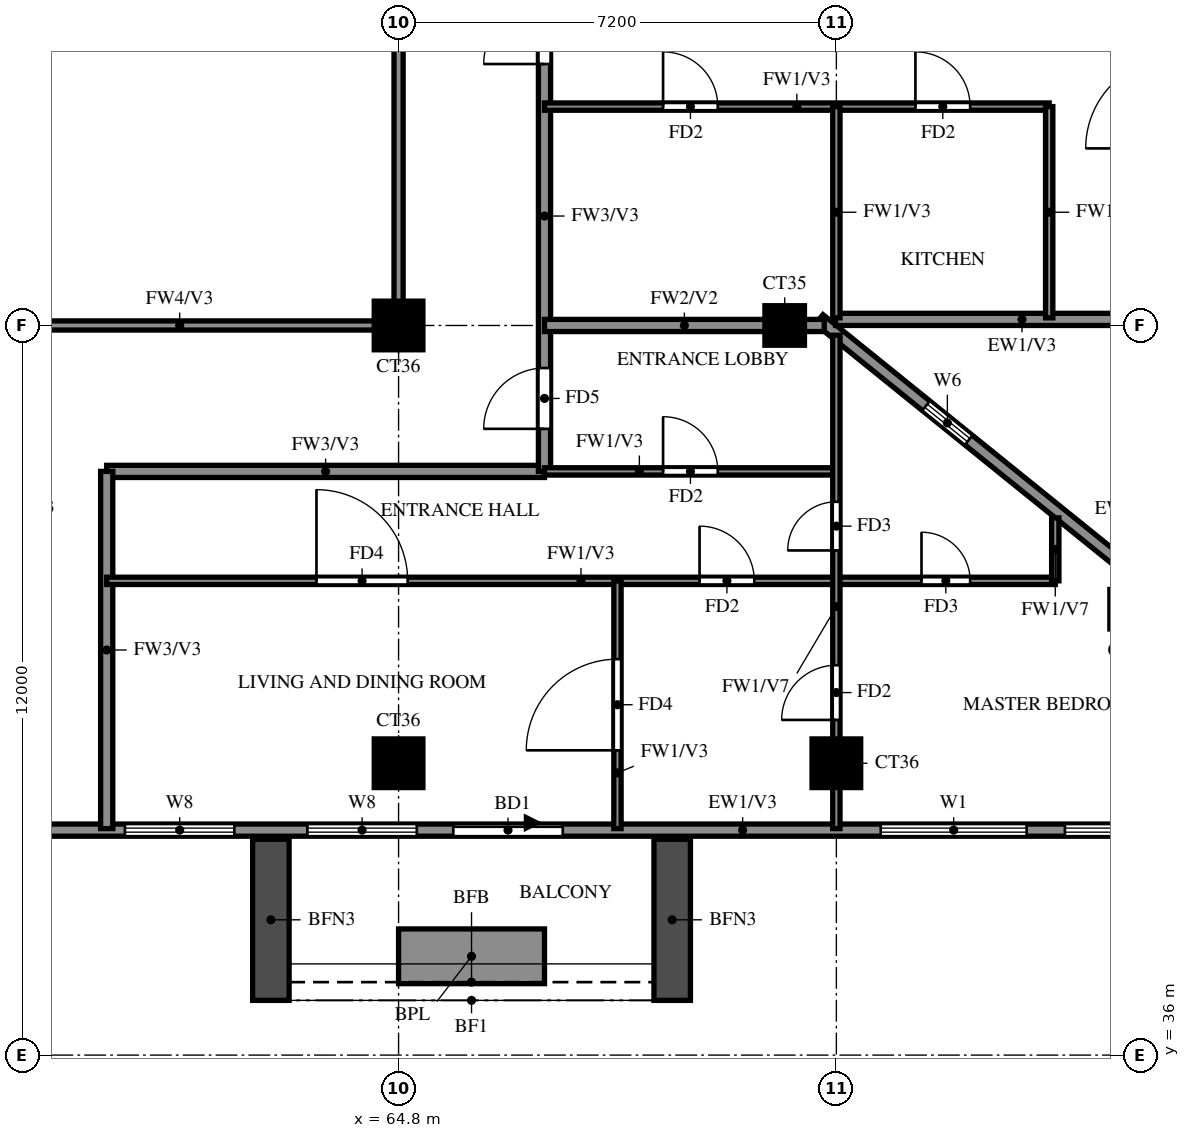
"""IFC4 building model, lengths in metres.
Left out: names, types, materials, properties, quantities, classifications, styles, units other than length and angle.
Written with IfcOpenShell. Run it as: python <this file> out.ifc"""

import sys

from ifc_helpers import new_model, si_unit, direction, frame, frame_2d, origin, origin_2d, place, context, subcontext, project, spatial, rectangle, extrude, source, transform, mapped, element, fill, save


model = new_model("IFC4")
c1 = context("Model", 3, precision=1e-05, world=origin(), true_north=direction((0.0, 1.0)))
c2 = subcontext(c1, "Body", "Model", "MODEL_VIEW")
j1 = project(units=[si_unit("LENGTHUNIT", "METRE"), si_unit("PLANEANGLEUNIT", "RADIAN")], contexts=[c1])
p1 = place(None, origin())
s1 = spatial("IfcSite", under=j1, at=p1, CompositionType="ELEMENT")
p2 = place(p1, origin())
s2 = spatial("IfcBuilding", under=s1, at=p2, CompositionType="ELEMENT")
p3 = place(p2, frame((0.0, 0.0, 250.0)))
s3 = spatial("IfcBuildingStorey", under=s2, at=p3, CompositionType="ELEMENT", Elevation=250.0)
m1 = source(origin(), c2, "Body", "SweptSolid", [
    extrude(rectangle(XDim=0.8, YDim=0.8, at=origin_2d()), origin(), (0.0, 0.0, 1.0), 3.22),
])
for number, where, z_axis, x_axis in (
    (1, (64.8, 40.8, 0.0), (0.0, 0.0, 1.0), (1.0, 0.0, 0.0)),
    (2, (72.0, 40.8, 0.0), (0.0, 0.0, 1.0), (1.0, 0.0, 0.0)),
):
    element("IfcColumn", number, at=place(p3, frame(where, z_axis=z_axis, x_axis=x_axis)), inside=s3, PredefinedType="COLUMN", context=c2, shape_type="MappedRepresentation", body=[
        mapped(m1, transform((0.0, 0.0, 0.0))),
    ])
m2 = source(origin(), c2, "Body", "SweptSolid", [
    extrude(rectangle(XDim=0.65, YDim=0.65, at=origin_2d()), origin(), (0.0, 0.0, 1.0), 3.22),
])
p4 = place(p3, frame((76.823, 43.333, 0.0), z_axis=(0.0, 0.0, 1.0), x_axis=(1.0, 0.0, 0.0)))
e3 = element("IfcColumn", 3, at=p4, inside=s3, PredefinedType="COLUMN", context=c2, shape_type="MappedRepresentation", body=[
    mapped(m2, transform((0.0, 0.0, 0.0))),
])
p5 = place(p3, frame((64.8, 48.0, 0.0), z_axis=(0.0, 0.0, 1.0), x_axis=(1.0, 0.0, 0.0)))
e4 = element("IfcColumn", 4, at=p5, inside=s3, PredefinedType="COLUMN", context=c2, shape_type="MappedRepresentation", body=[
    mapped(m1, transform((0.0, 0.0, 0.0))),
])
p6 = place(p3, frame((71.15, 48.0, 0.0), z_axis=(0.0, 0.0, 1.0), x_axis=(1.0, 0.0, 0.0)))
e5 = element("IfcColumn", 5, at=p6, inside=s3, PredefinedType="COLUMN", context=c2, shape_type="MappedRepresentation", body=[
    mapped(m2, transform((0.0, 0.0, 0.0))),
])
p7 = place(p3, frame((81.907, 39.87, 0.0), z_axis=(0.0, 0.0, 1.0), x_axis=(-0.777936274417, 0.62834318087, 0.0)))
e6 = element("IfcWall", 6, at=p7, inside=s3, PredefinedType="SOLIDWALL", context=c2, shape_type="SweptSolid", body=[
    extrude(rectangle(XDim=13.099, YDim=0.2, at=frame_2d((6.549, 0.0))), origin(), (0.0, 0.0, 1.0), 3.22),
])
p8 = place(p7, frame((9.938, 0.0, 1.5)))
e7 = element("IfcOpeningElement", 7, at=p8, cuts=e6, PredefinedType="OPENING", context=c2, shape_type="SweptSolid", body=[
    extrude(rectangle(XDim=0.9, YDim=0.9, at=frame_2d((0.45, 0.45))), frame((0.0, 0.11, 0.0), z_axis=(0.0, -1.0, 0.0), x_axis=(1.0, 0.0, 0.0)), (0.0, 0.0, 1.0), 0.22),
])
p9 = place(p3, frame((71.987, 48.1, 0.0), z_axis=(0.0, 0.0, 1.0), x_axis=(1.0, 0.0, 0.0)))
e8 = element("IfcWall", 8, at=p9, inside=s3, PredefinedType="SOLIDWALL", context=c2, shape_type="SweptSolid", body=[
    extrude(rectangle(XDim=6.813, YDim=0.2, at=frame_2d((3.406, 0.0))), origin(), (0.0, 0.0, 1.0), 3.22),
])
p10 = place(p3, frame((58.8, 39.7, 0.0), z_axis=(0.0, 0.0, 1.0), x_axis=(1.0, 0.0, 0.0)))
e9 = element("IfcWall", 9, at=p10, inside=s3, PredefinedType="SOLIDWALL", context=c2, shape_type="SweptSolid", body=[
    extrude(rectangle(XDim=23.317, YDim=0.2, at=frame_2d((11.658, 0.0))), origin(), (0.0, 0.0, 1.0), 3.22),
])
p11 = place(p10, frame((6.9, 0.0, 0.0)))
e10 = element("IfcOpeningElement", 10, at=p11, cuts=e9, PredefinedType="OPENING", context=c2, shape_type="SweptSolid", body=[
    extrude(rectangle(XDim=1.8, YDim=2.4, at=frame_2d((0.9, 1.2))), frame((0.0, 0.11, 0.0), z_axis=(0.0, -1.0, 0.0), x_axis=(1.0, 0.0, 0.0)), (0.0, 0.0, 1.0), 0.22),
])
p12 = place(p10, frame((1.5, 0.0, 0.6)))
e11 = element("IfcOpeningElement", 11, at=p12, cuts=e9, PredefinedType="OPENING", context=c2, shape_type="SweptSolid", body=[
    extrude(rectangle(XDim=1.8, YDim=2.4, at=frame_2d((0.9, 1.2))), frame((0.0, 0.11, 0.0), z_axis=(0.0, -1.0, 0.0), x_axis=(1.0, 0.0, 0.0)), (0.0, 0.0, 1.0), 0.22),
])
p13 = place(p10, frame((4.5, 0.0, 0.6)))
e12 = element("IfcOpeningElement", 12, at=p13, cuts=e9, PredefinedType="OPENING", context=c2, shape_type="SweptSolid", body=[
    extrude(rectangle(XDim=1.8, YDim=2.4, at=frame_2d((0.9, 1.2))), frame((0.0, 0.11, 0.0), z_axis=(0.0, -1.0, 0.0), x_axis=(1.0, 0.0, 0.0)), (0.0, 0.0, 1.0), 0.22),
])
p14 = place(p10, frame((13.929, 0.0, 0.6)))
e13 = element("IfcOpeningElement", 13, at=p14, cuts=e9, PredefinedType="OPENING", context=c2, shape_type="SweptSolid", body=[
    extrude(rectangle(XDim=2.4, YDim=2.4, at=frame_2d((1.2, 1.2))), frame((0.0, 0.11, 0.0), z_axis=(0.0, -1.0, 0.0), x_axis=(1.0, 0.0, 0.0)), (0.0, 0.0, 1.0), 0.22),
])
p15 = place(p10, frame((16.958, 0.0, 0.6)))
e14 = element("IfcOpeningElement", 14, at=p15, cuts=e9, PredefinedType="OPENING", context=c2, shape_type="SweptSolid", body=[
    extrude(rectangle(XDim=2.4, YDim=2.4, at=frame_2d((1.2, 1.2))), frame((0.0, 0.11, 0.0), z_axis=(0.0, -1.0, 0.0), x_axis=(1.0, 0.0, 0.0)), (0.0, 0.0, 1.0), 0.22),
])
p16 = place(p10, frame((19.988, 0.0, 0.6)))
e15 = element("IfcOpeningElement", 15, at=p16, cuts=e9, PredefinedType="OPENING", context=c2, shape_type="SweptSolid", body=[
    extrude(rectangle(XDim=2.4, YDim=2.4, at=frame_2d((1.2, 1.2))), frame((0.0, 0.11, 0.0), z_axis=(0.0, -1.0, 0.0), x_axis=(1.0, 0.0, 0.0)), (0.0, 0.0, 1.0), 0.22),
])
for number, where, z_axis, x_axis in (
    (16, (62.7, 39.55, 0.0), (0.0, 0.0, 1.0), (0.0, -1.0, 0.0)),
    (17, (69.3, 39.55, 0.0), (0.0, 0.0, 1.0), (0.0, -1.0, 0.0)),
):
    element("IfcWall", number, at=place(p3, frame(where, z_axis=z_axis, x_axis=x_axis)), inside=s3, PredefinedType="SOLIDWALL", context=c2, shape_type="SweptSolid", body=[
        extrude(rectangle(XDim=2.65, YDim=0.6, at=frame_2d((1.325, 0.0))), origin(), (0.0, 0.0, 1.0), 2.85),
    ])
p17 = place(p3, frame((64.8, 37.625, 0.0), z_axis=(0.0, 0.0, 1.0), x_axis=(1.0, 0.0, 0.0)))
e18 = element("IfcWall", 18, at=p17, inside=s3, PredefinedType="SOLIDWALL", context=c2, shape_type="SweptSolid", body=[
    extrude(rectangle(XDim=2.4, YDim=0.9, at=frame_2d((1.2, 0.0))), origin(), (0.0, 0.0, 1.0), 0.9),
])
p18 = place(p3, frame((60.0, 45.6, 0.0), z_axis=(0.0, 0.0, 1.0), x_axis=(1.0, 0.0, 0.0)))
e19 = element("IfcWall", 19, at=p18, inside=s3, PredefinedType="SOLIDWALL", context=c2, shape_type="SweptSolid", body=[
    extrude(rectangle(XDim=7.2, YDim=0.2, at=frame_2d((3.6, 0.0))), origin(), (0.0, 0.0, 1.0), 3.22),
])
p19 = place(p3, frame((60.0, 39.725, 0.0), z_axis=(0.0, 0.0, 1.0), x_axis=(0.0, 1.0, 0.0)))
e20 = element("IfcWall", 20, at=p19, inside=s3, PredefinedType="SOLIDWALL", context=c2, shape_type="SweptSolid", body=[
    extrude(rectangle(XDim=5.875, YDim=0.2, at=frame_2d((2.938, 0.0))), origin(), (0.0, 0.0, 1.0), 3.22),
])
p20 = place(p3, frame((67.2, 45.6, 0.0), z_axis=(0.0, 0.0, 1.0), x_axis=(0.0, 1.0, 0.0)))
e21 = element("IfcWall", 21, at=p20, inside=s3, PredefinedType="SOLIDWALL", context=c2, shape_type="SweptSolid", body=[
    extrude(rectangle(XDim=8.4, YDim=0.2, at=frame_2d((4.2, 0.0))), origin(), (0.0, 0.0, 1.0), 3.22),
])
p21 = place(p20, frame((6.7, 0.0, 0.0)))
e22 = element("IfcOpeningElement", 22, at=p21, cuts=e21, PredefinedType="OPENING", context=c2, shape_type="SweptSolid", body=[
    extrude(rectangle(XDim=1.0, YDim=2.1, at=frame_2d((0.5, 1.05))), frame((0.0, 0.11, 0.0), z_axis=(0.0, -1.0, 0.0), x_axis=(1.0, 0.0, 0.0)), (0.0, 0.0, 1.0), 0.22),
])
p22 = place(p20, frame((0.7, 0.0, 0.0)))
e23 = element("IfcOpeningElement", 23, at=p22, cuts=e21, PredefinedType="OPENING", context=c2, shape_type="SweptSolid", body=[
    extrude(rectangle(XDim=1.0, YDim=2.1, at=frame_2d((0.5, 1.05))), frame((0.0, 0.11, 0.0), z_axis=(0.0, -1.0, 0.0), x_axis=(1.0, 0.0, 0.0)), (0.0, 0.0, 1.0), 0.22),
])
p23 = place(p3, frame((67.2, 48.0, 0.0), z_axis=(0.0, 0.0, 1.0), x_axis=(1.0, 0.0, 0.0)))
e24 = element("IfcWall", 24, at=p23, inside=s3, PredefinedType="SOLIDWALL", context=c2, shape_type="SweptSolid", body=[
    extrude(rectangle(XDim=4.601, YDim=0.2, at=frame_2d((2.301, 0.0))), origin(), (0.0, 0.0, 1.0), 3.22),
])
p24 = place(p3, frame((60.0, 43.8, 0.0), z_axis=(0.0, 0.0, 1.0), x_axis=(1.0, 0.0, 0.0)))
e25 = element("IfcWall", 25, at=p24, inside=s3, PredefinedType="PARTITIONING", context=c2, shape_type="SweptSolid", body=[
    extrude(rectangle(XDim=15.6, YDim=0.12, at=frame_2d((7.8, 0.0))), origin(), (0.0, 0.0, 1.0), 3.22),
])
p25 = place(p24, frame((9.75, 0.0, 0.0)))
e26 = element("IfcOpeningElement", 26, at=p25, cuts=e25, PredefinedType="OPENING", context=c2, shape_type="SweptSolid", body=[
    extrude(rectangle(XDim=0.9, YDim=2.1, at=frame_2d((0.45, 1.05))), frame((0.0, 0.07, 0.0), z_axis=(0.0, -1.0, 0.0), x_axis=(1.0, 0.0, 0.0)), (0.0, 0.0, 1.0), 0.14),
])
p26 = place(p24, frame((3.45, 0.0, 0.0)))
e27 = element("IfcOpeningElement", 27, at=p26, cuts=e25, PredefinedType="OPENING", context=c2, shape_type="SweptSolid", body=[
    extrude(rectangle(XDim=1.5, YDim=2.1, at=frame_2d((0.75, 1.05))), frame((0.0, 0.07, 0.0), z_axis=(0.0, -1.0, 0.0), x_axis=(1.0, 0.0, 0.0)), (0.0, 0.0, 1.0), 0.14),
])
p27 = place(p24, frame((13.4, 0.0, 0.0)))
e28 = element("IfcOpeningElement", 28, at=p27, cuts=e25, PredefinedType="OPENING", context=c2, shape_type="SweptSolid", body=[
    extrude(rectangle(XDim=0.8, YDim=2.1, at=frame_2d((0.4, 1.05))), frame((0.0, 0.07, 0.0), z_axis=(0.0, -1.0, 0.0), x_axis=(1.0, 0.0, 0.0)), (0.0, 0.0, 1.0), 0.14),
])
p28 = place(p3, frame((67.2, 45.6, 0.0), z_axis=(0.0, 0.0, 1.0), x_axis=(1.0, 0.0, 0.0)))
e29 = element("IfcWall", 29, at=p28, inside=s3, PredefinedType="PARTITIONING", context=c2, shape_type="SweptSolid", body=[
    extrude(rectangle(XDim=4.8, YDim=0.12, at=frame_2d((2.4, 0.0))), origin(), (0.0, 0.0, 1.0), 3.22),
])
p29 = place(p28, frame((1.95, 0.0, 0.0)))
e30 = element("IfcOpeningElement", 30, at=p29, cuts=e29, PredefinedType="OPENING", context=c2, shape_type="SweptSolid", body=[
    extrude(rectangle(XDim=0.9, YDim=2.1, at=frame_2d((0.45, 1.05))), frame((0.0, 0.07, 0.0), z_axis=(0.0, -1.0, 0.0), x_axis=(1.0, 0.0, 0.0)), (0.0, 0.0, 1.0), 0.14),
])
p30 = place(p3, frame((67.2, 51.6, 0.0), z_axis=(0.0, 0.0, 1.0), x_axis=(1.0, 0.0, 0.0)))
e31 = element("IfcWall", 31, at=p30, inside=s3, PredefinedType="PARTITIONING", context=c2, shape_type="SweptSolid", body=[
    extrude(rectangle(XDim=8.3, YDim=0.12, at=frame_2d((4.15, 0.0))), origin(), (0.0, 0.0, 1.0), 3.22),
])
p31 = place(p30, frame((6.1, 0.0, 0.0)))
e32 = element("IfcOpeningElement", 32, at=p31, cuts=e31, PredefinedType="OPENING", context=c2, shape_type="SweptSolid", body=[
    extrude(rectangle(XDim=0.9, YDim=2.1, at=frame_2d((0.45, 1.05))), frame((0.0, 0.07, 0.0), z_axis=(0.0, -1.0, 0.0), x_axis=(1.0, 0.0, 0.0)), (0.0, 0.0, 1.0), 0.14),
])
p32 = place(p30, frame((1.95, 0.0, 0.0)))
e33 = element("IfcOpeningElement", 33, at=p32, cuts=e31, PredefinedType="OPENING", context=c2, shape_type="SweptSolid", body=[
    extrude(rectangle(XDim=0.9, YDim=2.1, at=frame_2d((0.45, 1.05))), frame((0.0, 0.07, 0.0), z_axis=(0.0, -1.0, 0.0), x_axis=(1.0, 0.0, 0.0)), (0.0, 0.0, 1.0), 0.14),
])
p33 = place(p3, frame((68.4, 39.725, 0.0), z_axis=(0.0, 0.0, 1.0), x_axis=(0.0, 1.0, 0.0)))
e34 = element("IfcWall", 34, at=p33, inside=s3, PredefinedType="PARTITIONING", context=c2, shape_type="SweptSolid", body=[
    extrude(rectangle(XDim=4.075, YDim=0.12, at=frame_2d((2.038, 0.0))), origin(), (0.0, 0.0, 1.0), 3.22),
])
p34 = place(p33, frame((1.288, 0.0, 0.0)))
e35 = element("IfcOpeningElement", 35, at=p34, cuts=e34, PredefinedType="OPENING", context=c2, shape_type="SweptSolid", body=[
    extrude(rectangle(XDim=1.5, YDim=2.1, at=frame_2d((0.75, 1.05))), frame((0.0, 0.07, 0.0), z_axis=(0.0, -1.0, 0.0), x_axis=(1.0, 0.0, 0.0)), (0.0, 0.0, 1.0), 0.14),
])
p35 = place(p3, frame((72.0, 39.725, 0.0), z_axis=(0.0, 0.0, 1.0), x_axis=(0.0, 1.0, 0.0)))
e36 = element("IfcWall", 36, at=p35, inside=s3, PredefinedType="PARTITIONING", context=c2, shape_type="SweptSolid", body=[
    extrude(rectangle(XDim=8.114, YDim=0.12, at=frame_2d((4.057, 0.0))), origin(), (0.0, 0.0, 1.0), 2.32),
])
p36 = place(p35, frame((1.788, 0.0, 0.0)))
e37 = element("IfcOpeningElement", 37, at=p36, cuts=e36, PredefinedType="OPENING", context=c2, shape_type="SweptSolid", body=[
    extrude(rectangle(XDim=0.9, YDim=2.1, at=frame_2d((0.45, 1.05))), frame((0.0, 0.07, 0.0), z_axis=(0.0, -1.0, 0.0), x_axis=(1.0, 0.0, 0.0)), (0.0, 0.0, 1.0), 0.14),
])
p37 = place(p35, frame((4.575, 0.0, 0.0)))
e38 = element("IfcOpeningElement", 38, at=p37, cuts=e36, PredefinedType="OPENING", context=c2, shape_type="SweptSolid", body=[
    extrude(rectangle(XDim=0.8, YDim=2.1, at=frame_2d((0.4, 1.05))), frame((0.0, 0.07, 0.0), z_axis=(0.0, -1.0, 0.0), x_axis=(1.0, 0.0, 0.0)), (0.0, 0.0, 1.0), 0.14),
])
for number, where, z_axis, x_axis in (
    (39, (72.0, 48.125, 0.0), (0.0, 0.0, 1.0), (0.0, 1.0, 0.0)),
    (40, (75.5, 48.125, 0.0), (0.0, 0.0, 1.0), (0.0, 1.0, 0.0)),
):
    element("IfcWall", number, at=place(p3, frame(where, z_axis=z_axis, x_axis=x_axis)), inside=s3, PredefinedType="PARTITIONING", context=c2, shape_type="SweptSolid", body=[
        extrude(rectangle(XDim=3.475, YDim=0.12, at=frame_2d((1.738, 0.0))), origin(), (0.0, 0.0, 1.0), 3.22),
    ])
p38 = place(p3, frame((75.6, 43.8, 0.0), z_axis=(0.0, 0.0, 1.0), x_axis=(0.0, 1.0, 0.0)))
e41 = element("IfcWall", 41, at=p38, inside=s3, PredefinedType="PARTITIONING", context=c2, shape_type="SweptSolid", body=[
    extrude(rectangle(XDim=1.035, YDim=0.12, at=frame_2d((0.518, 0.0))), origin(), (0.0, 0.0, 1.0), 2.32),
])
p39 = place(p3, frame((57.6, 48.0, 0.0), z_axis=(0.0, 0.0, 1.0), x_axis=(1.0, 0.0, 0.0)))
e42 = element("IfcWall", 42, at=p39, inside=s3, PredefinedType="SOLIDWALL", context=c2, shape_type="SweptSolid", body=[
    extrude(rectangle(XDim=7.2, YDim=0.15, at=frame_2d((3.6, 0.0))), origin(), (0.0, 0.0, 1.0), 2.32),
])
p40 = place(p3, frame((64.8, 48.0, 0.0), z_axis=(0.0, 0.0, 1.0), x_axis=(0.0, 1.0, 0.0)))
e43 = element("IfcWall", 43, at=p40, inside=s3, PredefinedType="SOLIDWALL", context=c2, shape_type="SweptSolid", body=[
    extrude(rectangle(XDim=14.4, YDim=0.15, at=frame_2d((7.2, 0.0))), origin(), (0.0, 0.0, 1.0), 2.32),
])
p41 = place(p8, origin())
e44 = element("IfcWindow", 44, at=p41, inside=s3, PartitioningType="SINGLE_PANEL", PredefinedType="WINDOW", context=c2, shape_type="SweptSolid", body=[
    extrude(rectangle(XDim=0.9, YDim=0.9, at=frame_2d((0.45, 0.45))), frame((0.0, 0.03, 0.0), z_axis=(0.0, -1.0, 0.0), x_axis=(1.0, 0.0, 0.0)), (0.0, 0.0, 1.0), 0.06),
])
fill(e7, e44)
p42 = place(p11, origin())
e45 = element("IfcDoor", 45, at=p42, inside=s3, OperationType="DOUBLE_DOOR_SLIDING", PredefinedType="DOOR", context=c2, shape_type="SweptSolid", body=[
    extrude(rectangle(XDim=1.8, YDim=2.4, at=frame_2d((0.9, 1.2))), frame((0.0, 0.025, 0.0), z_axis=(0.0, -1.0, 0.0), x_axis=(1.0, 0.0, 0.0)), (0.0, 0.0, 1.0), 0.05),
])
fill(e10, e45)
p43 = place(p12, origin())
e46 = element("IfcWindow", 46, at=p43, inside=s3, PartitioningType="DOUBLE_PANEL_VERTICAL", PredefinedType="WINDOW", context=c2, shape_type="SweptSolid", body=[
    extrude(rectangle(XDim=1.8, YDim=2.4, at=frame_2d((0.9, 1.2))), frame((0.0, 0.03, 0.0), z_axis=(0.0, -1.0, 0.0), x_axis=(1.0, 0.0, 0.0)), (0.0, 0.0, 1.0), 0.06),
])
fill(e11, e46)
p44 = place(p13, origin())
e47 = element("IfcWindow", 47, at=p44, inside=s3, PartitioningType="DOUBLE_PANEL_VERTICAL", PredefinedType="WINDOW", context=c2, shape_type="SweptSolid", body=[
    extrude(rectangle(XDim=1.8, YDim=2.4, at=frame_2d((0.9, 1.2))), frame((0.0, 0.03, 0.0), z_axis=(0.0, -1.0, 0.0), x_axis=(1.0, 0.0, 0.0)), (0.0, 0.0, 1.0), 0.06),
])
fill(e12, e47)
p45 = place(p14, origin())
e48 = element("IfcWindow", 48, at=p45, inside=s3, PartitioningType="DOUBLE_PANEL_VERTICAL", PredefinedType="WINDOW", context=c2, shape_type="SweptSolid", body=[
    extrude(rectangle(XDim=2.4, YDim=2.4, at=frame_2d((1.2, 1.2))), frame((0.0, 0.03, 0.0), z_axis=(0.0, -1.0, 0.0), x_axis=(1.0, 0.0, 0.0)), (0.0, 0.0, 1.0), 0.06),
])
fill(e13, e48)
p46 = place(p15, origin())
e49 = element("IfcWindow", 49, at=p46, inside=s3, PartitioningType="DOUBLE_PANEL_VERTICAL", PredefinedType="WINDOW", context=c2, shape_type="SweptSolid", body=[
    extrude(rectangle(XDim=2.4, YDim=2.4, at=frame_2d((1.2, 1.2))), frame((0.0, 0.03, 0.0), z_axis=(0.0, -1.0, 0.0), x_axis=(1.0, 0.0, 0.0)), (0.0, 0.0, 1.0), 0.06),
])
fill(e14, e49)
p47 = place(p21, origin())
e50 = element("IfcDoor", 50, at=p47, inside=s3, OperationType="SINGLE_SWING_LEFT", PredefinedType="DOOR", context=c2, shape_type="SweptSolid", body=[
    extrude(rectangle(XDim=1.0, YDim=2.1, at=frame_2d((0.5, 1.05))), frame((0.0, 0.025, 0.0), z_axis=(0.0, -1.0, 0.0), x_axis=(1.0, 0.0, 0.0)), (0.0, 0.0, 1.0), 0.05),
])
fill(e22, e50)
p48 = place(p31, origin())
e51 = element("IfcDoor", 51, at=p48, inside=s3, OperationType="SINGLE_SWING_LEFT", PredefinedType="DOOR", context=c2, shape_type="SweptSolid", body=[
    extrude(rectangle(XDim=0.9, YDim=2.1, at=frame_2d((0.45, 1.05))), frame((0.0, 0.025, 0.0), z_axis=(0.0, -1.0, 0.0), x_axis=(1.0, 0.0, 0.0)), (0.0, 0.0, 1.0), 0.05),
])
fill(e32, e51)
p49 = place(p32, origin())
e52 = element("IfcDoor", 52, at=p49, inside=s3, OperationType="SINGLE_SWING_LEFT", PredefinedType="DOOR", context=c2, shape_type="SweptSolid", body=[
    extrude(rectangle(XDim=0.9, YDim=2.1, at=frame_2d((0.45, 1.05))), frame((0.0, 0.025, 0.0), z_axis=(0.0, -1.0, 0.0), x_axis=(1.0, 0.0, 0.0)), (0.0, 0.0, 1.0), 0.05),
])
fill(e33, e52)
p50 = place(p34, origin())
e53 = element("IfcDoor", 53, at=p50, inside=s3, OperationType="SINGLE_SWING_LEFT", PredefinedType="DOOR", context=c2, shape_type="SweptSolid", body=[
    extrude(rectangle(XDim=1.5, YDim=2.1, at=frame_2d((0.75, 1.05))), frame((0.0, 0.025, 0.0), z_axis=(0.0, -1.0, 0.0), x_axis=(1.0, 0.0, 0.0)), (0.0, 0.0, 1.0), 0.05),
])
fill(e35, e53)
p51 = place(p29, origin())
e54 = element("IfcDoor", 54, at=p51, inside=s3, OperationType="SINGLE_SWING_LEFT", PredefinedType="DOOR", context=c2, shape_type="SweptSolid", body=[
    extrude(rectangle(XDim=0.9, YDim=2.1, at=frame_2d((0.45, 1.05))), frame((0.0, 0.025, 0.0), z_axis=(0.0, -1.0, 0.0), x_axis=(1.0, 0.0, 0.0)), (0.0, 0.0, 1.0), 0.05),
])
fill(e30, e54)
p52 = place(p22, origin())
e55 = element("IfcDoor", 55, at=p52, inside=s3, OperationType="SINGLE_SWING_RIGHT", PredefinedType="DOOR", context=c2, shape_type="SweptSolid", body=[
    extrude(rectangle(XDim=1.0, YDim=2.1, at=frame_2d((0.5, 1.05))), frame((0.0, 0.025, 0.0), z_axis=(0.0, -1.0, 0.0), x_axis=(1.0, 0.0, 0.0)), (0.0, 0.0, 1.0), 0.05),
])
fill(e23, e55)
p53 = place(p25, origin())
e56 = element("IfcDoor", 56, at=p53, inside=s3, OperationType="SINGLE_SWING_LEFT", PredefinedType="DOOR", context=c2, shape_type="SweptSolid", body=[
    extrude(rectangle(XDim=0.9, YDim=2.1, at=frame_2d((0.45, 1.05))), frame((0.0, 0.025, 0.0), z_axis=(0.0, -1.0, 0.0), x_axis=(1.0, 0.0, 0.0)), (0.0, 0.0, 1.0), 0.05),
])
fill(e26, e56)
p54 = place(p26, origin())
e57 = element("IfcDoor", 57, at=p54, inside=s3, OperationType="SINGLE_SWING_LEFT", PredefinedType="DOOR", context=c2, shape_type="SweptSolid", body=[
    extrude(rectangle(XDim=1.5, YDim=2.1, at=frame_2d((0.75, 1.05))), frame((0.0, 0.025, 0.0), z_axis=(0.0, -1.0, 0.0), x_axis=(1.0, 0.0, 0.0)), (0.0, 0.0, 1.0), 0.05),
])
fill(e27, e57)
p55 = place(p36, origin())
e58 = element("IfcDoor", 58, at=p55, inside=s3, OperationType="SINGLE_SWING_LEFT", PredefinedType="DOOR", context=c2, shape_type="SweptSolid", body=[
    extrude(rectangle(XDim=0.9, YDim=2.1, at=frame_2d((0.45, 1.05))), frame((0.0, 0.025, 0.0), z_axis=(0.0, -1.0, 0.0), x_axis=(1.0, 0.0, 0.0)), (0.0, 0.0, 1.0), 0.05),
])
fill(e37, e58)
p56 = place(p37, origin())
e59 = element("IfcDoor", 59, at=p56, inside=s3, OperationType="SINGLE_SWING_LEFT", PredefinedType="DOOR", context=c2, shape_type="SweptSolid", body=[
    extrude(rectangle(XDim=0.8, YDim=2.1, at=frame_2d((0.4, 1.05))), frame((0.0, 0.025, 0.0), z_axis=(0.0, -1.0, 0.0), x_axis=(1.0, 0.0, 0.0)), (0.0, 0.0, 1.0), 0.05),
])
fill(e38, e59)
p57 = place(p27, origin())
e60 = element("IfcDoor", 60, at=p57, inside=s3, OperationType="SINGLE_SWING_LEFT", PredefinedType="DOOR", context=c2, shape_type="SweptSolid", body=[
    extrude(rectangle(XDim=0.8, YDim=2.1, at=frame_2d((0.4, 1.05))), frame((0.0, 0.025, 0.0), z_axis=(0.0, -1.0, 0.0), x_axis=(1.0, 0.0, 0.0)), (0.0, 0.0, 1.0), 0.05),
])
fill(e28, e60)
save(model, sys.argv[1])
